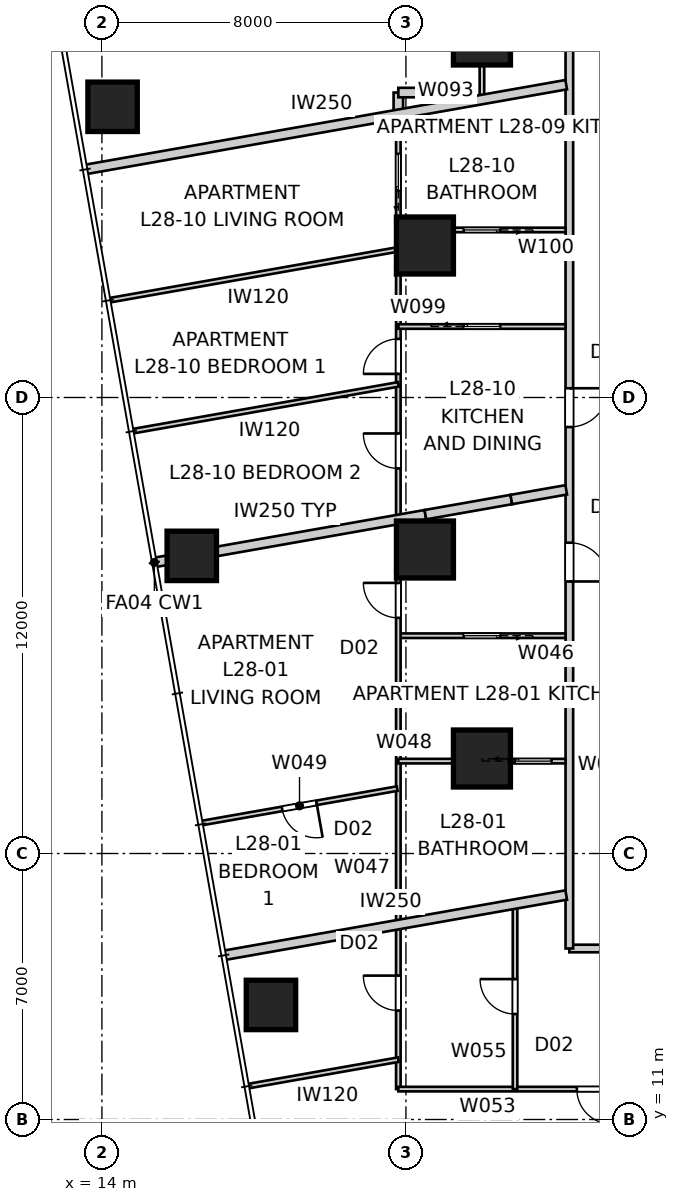
"""IFC4 building model, lengths in metres.
Left out: names, types, materials, properties, quantities, classifications, styles, units other than length and angle.
Written with IfcOpenShell. Run it as: python <this file> out.ifc"""

import sys

from ifc_helpers import new_model, si_unit, direction, frame, frame_2d, origin, origin_2d, place, context, subcontext, project, spatial, rectangle, extrude, element, fill, save


model = new_model("IFC4")
c1 = context("Model", 3, precision=1e-05, world=origin(), true_north=direction((0.0, 1.0)))
c2 = subcontext(c1, "Body", "Model", "MODEL_VIEW")
j1 = project(units=[si_unit("LENGTHUNIT", "METRE"), si_unit("PLANEANGLEUNIT", "RADIAN")], contexts=[c1])
p1 = place(None, origin())
s1 = spatial("IfcSite", under=j1, at=p1, CompositionType="ELEMENT")
p2 = place(p1, origin())
s2 = spatial("IfcBuilding", under=s1, at=p2, CompositionType="ELEMENT")
p3 = place(p2, frame((0.0, 0.0, 103.2)))
s3 = spatial("IfcBuildingStorey", under=s2, at=p3, CompositionType="ELEMENT", Elevation=103.2)
for number, where, z_axis, x_axis in (
    (1, (14.281, 37.65, 0.0), (0.0, 0.0, 1.0), (1.0, 0.0, 0.0)),
    (2, (16.365, 25.833, 0.0), (0.0, 0.0, 1.0), (1.0, 0.0, 0.0)),
    (3, (18.448, 14.015, 0.0), (0.0, 0.0, 1.0), (1.0, 0.0, 0.0)),
):
    element("IfcColumn", number, at=place(p3, frame(where, z_axis=z_axis, x_axis=x_axis)), inside=s3, PredefinedType="COLUMN", context=c2, shape_type="SweptSolid", body=[
        extrude(rectangle(XDim=1.3, YDim=1.3, at=origin_2d()), origin(), (0.0, 0.0, 1.0), 3.2),
    ])
for number, where, z_axis, x_axis in (
    (4, (24.0, 39.5, 0.0), (0.0, 0.0, 1.0), (1.0, 0.0, 0.0)),
    (5, (22.5, 34.0, 0.0), (0.0, 0.0, 1.0), (1.0, 0.0, 0.0)),
    (6, (22.5, 26.0, 0.0), (0.0, 0.0, 1.0), (1.0, 0.0, 0.0)),
    (7, (24.0, 20.5, 0.0), (0.0, 0.0, 1.0), (1.0, 0.0, 0.0)),
):
    element("IfcColumn", number, at=place(p3, frame(where, z_axis=z_axis, x_axis=x_axis)), inside=s3, PredefinedType="COLUMN", context=c2, shape_type="SweptSolid", body=[
        extrude(rectangle(XDim=1.5, YDim=1.5, at=origin_2d()), origin(), (0.0, 0.0, 1.0), 3.4),
    ])
p4 = place(p3, frame((26.3, 15.5, 0.0), z_axis=(0.0, 0.0, 1.0), x_axis=(1.0, 0.0, 0.0)))
e8 = element("IfcWall", 8, at=p4, inside=s3, PredefinedType="PARTITIONING", context=c2, shape_type="SweptSolid", body=[
    extrude(rectangle(XDim=27.4, YDim=0.2, at=frame_2d((13.7, 0.0))), origin(), (0.0, 0.0, 1.0), 3.2),
])
p5 = place(p4, frame((24.455, 0.0, 0.0)))
e9 = element("IfcOpeningElement", 9, at=p5, cuts=e8, PredefinedType="OPENING", context=c2, shape_type="SweptSolid", body=[
    extrude(rectangle(XDim=1.02, YDim=2.0, at=frame_2d((0.51, 1.0))), frame((0.0, 0.11, 0.0), z_axis=(0.0, -1.0, 0.0), x_axis=(1.0, 0.0, 0.0)), (0.0, 0.0, 1.0), 0.22),
])
p6 = place(p4, frame((1.765, 0.0, 0.0)))
e10 = element("IfcOpeningElement", 10, at=p6, cuts=e8, PredefinedType="OPENING", context=c2, shape_type="SweptSolid", body=[
    extrude(rectangle(XDim=1.02, YDim=2.0, at=frame_2d((0.51, 1.0))), frame((0.0, 0.11, 0.0), z_axis=(0.0, -1.0, 0.0), x_axis=(1.0, 0.0, 0.0)), (0.0, 0.0, 1.0), 0.22),
])
p7 = place(p3, frame((26.3, 44.5, 0.0), z_axis=(0.0, 0.0, 1.0), x_axis=(0.0, -1.0, 0.0)))
e11 = element("IfcWall", 11, at=p7, inside=s3, PredefinedType="PARTITIONING", context=c2, shape_type="SweptSolid", body=[
    extrude(rectangle(XDim=29.0, YDim=0.2, at=frame_2d((14.5, 0.0))), origin(), (0.0, 0.0, 1.0), 3.2),
])
p8 = place(p7, frame((14.257, 0.0, 0.0)))
e12 = element("IfcOpeningElement", 12, at=p8, cuts=e11, PredefinedType="OPENING", context=c2, shape_type="SweptSolid", body=[
    extrude(rectangle(XDim=1.02, YDim=2.34, at=frame_2d((0.51, 1.17))), frame((0.0, 0.11, 0.0), z_axis=(0.0, -1.0, 0.0), x_axis=(1.0, 0.0, 0.0)), (0.0, 0.0, 1.0), 0.22),
])
p9 = place(p7, frame((18.322, 0.0, 0.0)))
e13 = element("IfcOpeningElement", 13, at=p9, cuts=e11, PredefinedType="OPENING", context=c2, shape_type="SweptSolid", body=[
    extrude(rectangle(XDim=1.02, YDim=2.34, at=frame_2d((0.51, 1.17))), frame((0.0, 0.11, 0.0), z_axis=(0.0, -1.0, 0.0), x_axis=(1.0, 0.0, 0.0)), (0.0, 0.0, 1.0), 0.22),
])
p10 = place(p7, frame((4.263, 0.0, 0.0)))
e14 = element("IfcOpeningElement", 14, at=p10, cuts=e11, PredefinedType="OPENING", context=c2, shape_type="SweptSolid", body=[
    extrude(rectangle(XDim=1.02, YDim=2.34, at=frame_2d((0.51, 1.17))), frame((0.0, 0.11, 0.0), z_axis=(0.0, -1.0, 0.0), x_axis=(1.0, 0.0, 0.0)), (0.0, 0.0, 1.0), 0.22),
])
p11 = place(p3, frame((13.556, 35.999, 0.0), z_axis=(0.0, 0.0, 1.0), x_axis=(0.984809355703, 0.173639088111, 0.0)))
e15 = element("IfcWall", 15, at=p11, inside=s3, PredefinedType="PARTITIONING", context=c2, shape_type="SweptSolid", body=[
    extrude(rectangle(XDim=12.857, YDim=0.25, at=frame_2d((6.428, 0.0))), origin(), (0.0, 0.0, 1.0), 3.2),
])
p12 = place(p3, frame((17.203, 15.318, 0.0), z_axis=(0.0, 0.0, 1.0), x_axis=(0.984810933893, 0.173630137029, 0.0)))
e16 = element("IfcWall", 16, at=p12, inside=s3, PredefinedType="PARTITIONING", context=c2, shape_type="SweptSolid", body=[
    extrude(rectangle(XDim=9.154, YDim=0.25, at=frame_2d((4.577, 0.0))), origin(), (0.0, 0.0, 1.0), 3.2),
])
p13 = place(p3, frame((15.38, 25.659, 0.0), z_axis=(0.0, 0.0, 1.0), x_axis=(0.984806967559, 0.173652632134, 0.0)))
e17 = element("IfcWall", 17, at=p13, inside=s3, PredefinedType="PARTITIONING", context=c2, shape_type="SweptSolid", body=[
    extrude(rectangle(XDim=7.242, YDim=0.25, at=frame_2d((3.621, 0.0))), origin(), (0.0, 0.0, 1.0), 3.2),
])
p14 = place(p3, frame((22.512, 26.916, 0.0), z_axis=(0.0, 0.0, 1.0), x_axis=(0.98479532969, 0.173718619099, 0.0)))
e18 = element("IfcWall", 18, at=p14, inside=s3, PredefinedType="PARTITIONING", context=c2, shape_type="SweptSolid", body=[
    extrude(rectangle(XDim=2.296, YDim=0.25, at=frame_2d((1.148, 0.0))), origin(), (0.0, 0.0, 1.0), 2.672),
])
p15 = place(p3, frame((24.773, 27.315, 0.0), z_axis=(0.0, 0.0, 1.0), x_axis=(0.984817051632, 0.173595434317, 0.0)))
e19 = element("IfcWall", 19, at=p15, inside=s3, PredefinedType="PARTITIONING", context=c2, shape_type="SweptSolid", body=[
    extrude(rectangle(XDim=1.467, YDim=0.25, at=frame_2d((0.733, 0.0))), origin(), (0.0, 0.0, 1.0), 3.2),
])
p16 = place(p3, frame((26.2, 23.731, 0.0), z_axis=(0.0, 0.0, 1.0), x_axis=(-1.0, 0.0, 0.0)))
e20 = element("IfcWall", 20, at=p16, inside=s3, PredefinedType="PARTITIONING", context=c2, shape_type="SweptSolid", body=[
    extrude(rectangle(XDim=4.4, YDim=0.12, at=frame_2d((2.2, 0.0))), origin(), (0.0, 0.0, 1.0), 3.2),
])
p17 = place(p16, frame((1.72, 0.0, 0.0)))
e21 = element("IfcOpeningElement", 21, at=p17, cuts=e20, PredefinedType="OPENING", context=c2, shape_type="SweptSolid", body=[
    extrude(rectangle(XDim=0.96, YDim=2.1, at=frame_2d((0.48, 1.05))), frame((0.0, 0.07, 0.0), z_axis=(0.0, -1.0, 0.0), x_axis=(1.0, 0.0, 0.0)), (0.0, 0.0, 1.0), 0.14),
])
p18 = place(p3, frame((21.8, 11.8, 0.0), z_axis=(0.0, 0.0, 1.0), x_axis=(0.0, 1.0, 0.0)))
e22 = element("IfcWall", 22, at=p18, inside=s3, PredefinedType="PARTITIONING", context=c2, shape_type="SweptSolid", body=[
    extrude(rectangle(XDim=25.653, YDim=0.12, at=frame_2d((12.826, 0.0))), origin(), (0.0, 0.0, 1.0), 3.2),
])
p19 = place(p18, frame((16.333, 0.0, 0.0)))
e23 = element("IfcOpeningElement", 23, at=p19, cuts=e22, PredefinedType="OPENING", context=c2, shape_type="SweptSolid", body=[
    extrude(rectangle(XDim=0.92, YDim=2.34, at=frame_2d((0.46, 1.17))), frame((0.0, 0.07, 0.0), z_axis=(0.0, -1.0, 0.0), x_axis=(1.0, 0.0, 0.0)), (0.0, 0.0, 1.0), 0.14),
])
p20 = place(p18, frame((18.821, 0.0, 0.0)))
e24 = element("IfcOpeningElement", 24, at=p20, cuts=e22, PredefinedType="OPENING", context=c2, shape_type="SweptSolid", body=[
    extrude(rectangle(XDim=0.92, YDim=2.34, at=frame_2d((0.46, 1.17))), frame((0.0, 0.07, 0.0), z_axis=(0.0, -1.0, 0.0), x_axis=(1.0, 0.0, 0.0)), (0.0, 0.0, 1.0), 0.14),
])
p21 = place(p18, frame((12.401, 0.0, 0.0)))
e25 = element("IfcOpeningElement", 25, at=p21, cuts=e22, PredefinedType="OPENING", context=c2, shape_type="SweptSolid", body=[
    extrude(rectangle(XDim=0.92, YDim=2.34, at=frame_2d((0.46, 1.17))), frame((0.0, 0.07, 0.0), z_axis=(0.0, -1.0, 0.0), x_axis=(1.0, 0.0, 0.0)), (0.0, 0.0, 1.0), 0.14),
])
p22 = place(p18, frame((2.066, 0.0, 0.0)))
e26 = element("IfcOpeningElement", 26, at=p22, cuts=e22, PredefinedType="OPENING", context=c2, shape_type="SweptSolid", body=[
    extrude(rectangle(XDim=0.92, YDim=2.34, at=frame_2d((0.46, 1.17))), frame((0.0, 0.07, 0.0), z_axis=(0.0, -1.0, 0.0), x_axis=(1.0, 0.0, 0.0)), (0.0, 0.0, 1.0), 0.14),
])
p23 = place(p18, frame((23.651, 0.0, 0.0)))
e27 = element("IfcOpeningElement", 27, at=p23, cuts=e22, PredefinedType="OPENING", context=c2, shape_type="SweptSolid", body=[
    extrude(rectangle(XDim=0.96, YDim=2.1, at=frame_2d((0.48, 1.05))), frame((0.0, 0.07, 0.0), z_axis=(0.0, -1.0, 0.0), x_axis=(1.0, 0.0, 0.0)), (0.0, 0.0, 1.0), 0.14),
])
p24 = place(p3, frame((21.8, 20.431, 0.0), z_axis=(0.0, 0.0, 1.0), x_axis=(1.0, 0.0, 0.0)))
e28 = element("IfcWall", 28, at=p24, inside=s3, PredefinedType="PARTITIONING", context=c2, shape_type="SweptSolid", body=[
    extrude(rectangle(XDim=4.4, YDim=0.12, at=frame_2d((2.2, 0.0))), origin(), (0.0, 0.0, 1.0), 3.2),
])
p25 = place(p24, frame((3.07, 0.0, 0.0)))
e29 = element("IfcOpeningElement", 29, at=p25, cuts=e28, PredefinedType="OPENING", context=c2, shape_type="SweptSolid", body=[
    extrude(rectangle(XDim=0.96, YDim=2.1, at=frame_2d((0.48, 1.05))), frame((0.0, 0.07, 0.0), z_axis=(0.0, -1.0, 0.0), x_axis=(1.0, 0.0, 0.0)), (0.0, 0.0, 1.0), 0.14),
])
p26 = place(p3, frame((21.77, 19.708, 0.0), z_axis=(0.0, 0.0, 1.0), x_axis=(-0.984812268581, -0.173622566657, 0.0)))
e30 = element("IfcWall", 30, at=p26, inside=s3, PredefinedType="PARTITIONING", context=c2, shape_type="SweptSolid", body=[
    extrude(rectangle(XDim=5.22, YDim=0.12, at=frame_2d((2.61, 0.0))), origin(), (0.0, 0.0, 1.0), 3.2),
])
p27 = place(p26, frame((2.155, 0.0, 0.0)))
e31 = element("IfcOpeningElement", 31, at=p27, cuts=e30, PredefinedType="OPENING", context=c2, shape_type="SweptSolid", body=[
    extrude(rectangle(XDim=0.92, YDim=2.34, at=frame_2d((0.46, 1.17))), frame((0.0, 0.07, 0.0), z_axis=(0.0, -1.0, 0.0), x_axis=(1.0, 0.0, 0.0)), (0.0, 0.0, 1.0), 0.14),
])
p28 = place(p3, frame((21.8, 37.478, 0.0), z_axis=(0.0, 0.0, 1.0), x_axis=(0.0, 1.0, 0.0)))
e32 = element("IfcWall", 32, at=p28, inside=s3, PredefinedType="PARTITIONING", context=c2, shape_type="SweptSolid", body=[
    extrude(rectangle(XDim=0.547, YDim=0.25, at=frame_2d((0.273, 0.0))), origin(), (0.0, 0.0, 1.0), 3.2),
])
p29 = place(p3, frame((21.8, 38.025, 0.0), z_axis=(0.0, 0.0, 1.0), x_axis=(1.0, 0.0, 0.0)))
e33 = element("IfcWall", 33, at=p29, inside=s3, PredefinedType="PARTITIONING", context=c2, shape_type="SweptSolid", body=[
    extrude(rectangle(XDim=1.861, YDim=0.25, at=frame_2d((0.93, 0.0))), origin(), (0.0, 0.0, 1.0), 3.2),
])
p30 = place(p3, frame((31.975, 11.8, 0.0), z_axis=(0.0, 0.0, 1.0), x_axis=(-1.0, 0.0, 0.0)))
e34 = element("IfcWall", 34, at=p30, inside=s3, PredefinedType="PARTITIONING", context=c2, shape_type="SweptSolid", body=[
    extrude(rectangle(XDim=10.175, YDim=0.12, at=frame_2d((5.088, 0.0))), origin(), (0.0, 0.0, 1.0), 3.2),
])
p31 = place(p30, frame((4.558, 0.0, 0.0)))
e35 = element("IfcOpeningElement", 35, at=p31, cuts=e34, PredefinedType="OPENING", context=c2, shape_type="SweptSolid", body=[
    extrude(rectangle(XDim=0.92, YDim=2.0, at=frame_2d((0.46, 1.0))), frame((0.0, 0.07, 0.0), z_axis=(0.0, -1.0, 0.0), x_axis=(1.0, 0.0, 0.0)), (0.0, 0.0, 1.0), 0.14),
])
p32 = place(p3, frame((24.871, 11.8, 0.0), z_axis=(0.0, 0.0, 1.0), x_axis=(0.0, 1.0, 0.0)))
e36 = element("IfcWall", 36, at=p32, inside=s3, PredefinedType="PARTITIONING", context=c2, shape_type="SweptSolid", body=[
    extrude(rectangle(XDim=4.87, YDim=0.12, at=frame_2d((2.435, 0.0))), origin(), (0.0, 0.0, 1.0), 3.2),
])
p33 = place(p32, frame((1.975, 0.0, 0.0)))
e37 = element("IfcOpeningElement", 37, at=p33, cuts=e36, PredefinedType="OPENING", context=c2, shape_type="SweptSolid", body=[
    extrude(rectangle(XDim=0.92, YDim=2.34, at=frame_2d((0.46, 1.17))), frame((0.0, 0.07, 0.0), z_axis=(0.0, -1.0, 0.0), x_axis=(1.0, 0.0, 0.0)), (0.0, 0.0, 1.0), 0.14),
])
p34 = place(p3, frame((17.85, 11.878, 0.0), z_axis=(0.0, 0.0, 1.0), x_axis=(0.984803775068, 0.173670736201, 0.0)))
e38 = element("IfcWall", 38, at=p34, inside=s3, PredefinedType="PARTITIONING", context=c2, shape_type="SweptSolid", body=[
    extrude(rectangle(XDim=4.011, YDim=0.12, at=frame_2d((2.005, 0.0))), origin(), (0.0, 0.0, 1.0), 2.4),
])
p35 = place(p3, frame((24.0, 37.948, 0.0), z_axis=(0.0, 0.0, 1.0), x_axis=(0.0, 1.0, 0.0)))
e39 = element("IfcWall", 39, at=p35, inside=s3, PredefinedType="PARTITIONING", context=c2, shape_type="SweptSolid", body=[
    extrude(rectangle(XDim=3.847, YDim=0.12, at=frame_2d((1.923, 0.0))), origin(), (0.0, 0.0, 1.0), 2.2),
])
p36 = place(p35, frame((2.402, 0.0, 0.0)))
e40 = element("IfcOpeningElement", 40, at=p36, cuts=e39, PredefinedType="OPENING", context=c2, shape_type="SweptSolid", body=[
    extrude(rectangle(XDim=0.92, YDim=2.0, at=frame_2d((0.46, 1.0))), frame((0.0, 0.07, 0.0), z_axis=(0.0, -1.0, 0.0), x_axis=(1.0, 0.0, 0.0)), (0.0, 0.0, 1.0), 0.14),
])
p37 = place(p3, frame((21.8, 31.868, 0.0), z_axis=(0.0, 0.0, 1.0), x_axis=(1.0, 0.0, 0.0)))
e41 = element("IfcWall", 41, at=p37, inside=s3, PredefinedType="PARTITIONING", context=c2, shape_type="SweptSolid", body=[
    extrude(rectangle(XDim=4.4, YDim=0.12, at=frame_2d((2.2, 0.0))), origin(), (0.0, 0.0, 1.0), 3.2),
])
p38 = place(p37, frame((1.72, 0.0, 0.0)))
e42 = element("IfcOpeningElement", 42, at=p38, cuts=e41, PredefinedType="OPENING", context=c2, shape_type="SweptSolid", body=[
    extrude(rectangle(XDim=0.96, YDim=2.1, at=frame_2d((0.48, 1.05))), frame((0.0, 0.07, 0.0), z_axis=(0.0, -1.0, 0.0), x_axis=(1.0, 0.0, 0.0)), (0.0, 0.0, 1.0), 0.14),
])
p39 = place(p3, frame((26.2, 34.409, 0.0), z_axis=(0.0, 0.0, 1.0), x_axis=(-1.0, 0.0, 0.0)))
e43 = element("IfcWall", 43, at=p39, inside=s3, PredefinedType="PARTITIONING", context=c2, shape_type="SweptSolid", body=[
    extrude(rectangle(XDim=4.4, YDim=0.12, at=frame_2d((2.2, 0.0))), origin(), (0.0, 0.0, 1.0), 3.2),
])
p40 = place(p39, frame((1.72, 0.0, 0.0)))
e44 = element("IfcOpeningElement", 44, at=p40, cuts=e43, PredefinedType="OPENING", context=c2, shape_type="SweptSolid", body=[
    extrude(rectangle(XDim=0.96, YDim=2.1, at=frame_2d((0.48, 1.05))), frame((0.0, 0.07, 0.0), z_axis=(0.0, -1.0, 0.0), x_axis=(1.0, 0.0, 0.0)), (0.0, 0.0, 1.0), 0.14),
])
p41 = place(p3, frame((21.8, 33.899, 0.0), z_axis=(0.0, 0.0, 1.0), x_axis=(-0.984804581119, -0.173666165406, 0.0)))
e45 = element("IfcWall", 45, at=p41, inside=s3, PredefinedType="PARTITIONING", context=c2, shape_type="SweptSolid", body=[
    extrude(rectangle(XDim=7.714, YDim=0.12, at=frame_2d((3.857, 0.0))), origin(), (0.0, 0.0, 1.0), 3.2),
])
p42 = place(p3, frame((21.8, 30.345, 0.0), z_axis=(0.0, 0.0, 1.0), x_axis=(-0.984809869921, -0.17363617165, 0.0)))
e46 = element("IfcWall", 46, at=p42, inside=s3, PredefinedType="PARTITIONING", context=c2, shape_type="SweptSolid", body=[
    extrude(rectangle(XDim=7.096, YDim=0.12, at=frame_2d((3.548, 0.0))), origin(), (0.0, 0.0, 1.0), 3.2),
])
p43 = place(p8, origin())
e47 = element("IfcDoor", 47, at=p43, inside=s3, OperationType="SINGLE_SWING_LEFT", PredefinedType="DOOR", context=c2, shape_type="SweptSolid", body=[
    extrude(rectangle(XDim=1.02, YDim=2.34, at=frame_2d((0.51, 1.17))), frame((0.0, 0.025, 0.0), z_axis=(0.0, -1.0, 0.0), x_axis=(1.0, 0.0, 0.0)), (0.0, 0.0, 1.0), 0.05),
])
fill(e12, e47)
p44 = place(p9, origin())
e48 = element("IfcDoor", 48, at=p44, inside=s3, OperationType="SINGLE_SWING_RIGHT", PredefinedType="DOOR", context=c2, shape_type="SweptSolid", body=[
    extrude(rectangle(XDim=1.02, YDim=2.34, at=frame_2d((0.51, 1.17))), frame((0.0, 0.025, 0.0), z_axis=(0.0, -1.0, 0.0), x_axis=(1.0, 0.0, 0.0)), (0.0, 0.0, 1.0), 0.05),
])
fill(e13, e48)
p45 = place(p38, origin())
e49 = element("IfcDoor", 49, at=p45, inside=s3, OperationType="SLIDING_TO_LEFT", PredefinedType="DOOR", context=c2, shape_type="SweptSolid", body=[
    extrude(rectangle(XDim=0.96, YDim=2.1, at=frame_2d((0.48, 1.05))), frame((0.0, 0.025, 0.0), z_axis=(0.0, -1.0, 0.0), x_axis=(1.0, 0.0, 0.0)), (0.0, 0.0, 1.0), 0.05),
])
fill(e42, e49)
p46 = place(p19, origin())
e50 = element("IfcDoor", 50, at=p46, inside=s3, OperationType="SINGLE_SWING_RIGHT", PredefinedType="DOOR", context=c2, shape_type="SweptSolid", body=[
    extrude(rectangle(XDim=0.92, YDim=2.34, at=frame_2d((0.46, 1.17))), frame((0.0, 0.025, 0.0), z_axis=(0.0, -1.0, 0.0), x_axis=(1.0, 0.0, 0.0)), (0.0, 0.0, 1.0), 0.05),
])
fill(e23, e50)
p47 = place(p20, origin())
e51 = element("IfcDoor", 51, at=p47, inside=s3, OperationType="SINGLE_SWING_LEFT", PredefinedType="DOOR", context=c2, shape_type="SweptSolid", body=[
    extrude(rectangle(XDim=0.92, YDim=2.34, at=frame_2d((0.46, 1.17))), frame((0.0, 0.025, 0.0), z_axis=(0.0, -1.0, 0.0), x_axis=(1.0, 0.0, 0.0)), (0.0, 0.0, 1.0), 0.05),
])
fill(e24, e51)
p48 = place(p17, origin())
e52 = element("IfcDoor", 52, at=p48, inside=s3, OperationType="SLIDING_TO_LEFT", PredefinedType="DOOR", context=c2, shape_type="SweptSolid", body=[
    extrude(rectangle(XDim=0.96, YDim=2.1, at=frame_2d((0.48, 1.05))), frame((0.0, 0.025, 0.0), z_axis=(0.0, -1.0, 0.0), x_axis=(1.0, 0.0, 0.0)), (0.0, 0.0, 1.0), 0.05),
])
fill(e21, e52)
p49 = place(p21, origin())
e53 = element("IfcDoor", 53, at=p49, inside=s3, OperationType="SINGLE_SWING_RIGHT", PredefinedType="DOOR", context=c2, shape_type="SweptSolid", body=[
    extrude(rectangle(XDim=0.92, YDim=2.34, at=frame_2d((0.46, 1.17))), frame((0.0, 0.025, 0.0), z_axis=(0.0, -1.0, 0.0), x_axis=(1.0, 0.0, 0.0)), (0.0, 0.0, 1.0), 0.05),
])
fill(e25, e53)
p50 = place(p33, origin())
e54 = element("IfcDoor", 54, at=p50, inside=s3, OperationType="SINGLE_SWING_RIGHT", PredefinedType="DOOR", context=c2, shape_type="SweptSolid", body=[
    extrude(rectangle(XDim=0.92, YDim=2.34, at=frame_2d((0.46, 1.17))), frame((0.0, 0.025, 0.0), z_axis=(0.0, -1.0, 0.0), x_axis=(1.0, 0.0, 0.0)), (0.0, 0.0, 1.0), 0.05),
])
fill(e37, e54)
p51 = place(p31, origin())
e55 = element("IfcDoor", 55, at=p51, inside=s3, OperationType="SINGLE_SWING_LEFT", PredefinedType="DOOR", context=c2, shape_type="SweptSolid", body=[
    extrude(rectangle(XDim=0.92, YDim=2.0, at=frame_2d((0.46, 1.0))), frame((0.0, 0.025, 0.0), z_axis=(0.0, -1.0, 0.0), x_axis=(1.0, 0.0, 0.0)), (0.0, 0.0, 1.0), 0.05),
])
fill(e35, e55)
p52 = place(p40, origin())
e56 = element("IfcDoor", 56, at=p52, inside=s3, OperationType="SLIDING_TO_LEFT", PredefinedType="DOOR", context=c2, shape_type="SweptSolid", body=[
    extrude(rectangle(XDim=0.96, YDim=2.1, at=frame_2d((0.48, 1.05))), frame((0.0, 0.025, 0.0), z_axis=(0.0, -1.0, 0.0), x_axis=(1.0, 0.0, 0.0)), (0.0, 0.0, 1.0), 0.05),
])
fill(e44, e56)
p53 = place(p25, origin())
e57 = element("IfcDoor", 57, at=p53, inside=s3, OperationType="SLIDING_TO_LEFT", PredefinedType="DOOR", context=c2, shape_type="SweptSolid", body=[
    extrude(rectangle(XDim=0.96, YDim=2.1, at=frame_2d((0.48, 1.05))), frame((0.0, 0.025, 0.0), z_axis=(0.0, -1.0, 0.0), x_axis=(1.0, 0.0, 0.0)), (0.0, 0.0, 1.0), 0.05),
])
fill(e29, e57)
p54 = place(p27, origin())
e58 = element("IfcDoor", 58, at=p54, inside=s3, OperationType="SINGLE_SWING_LEFT", PredefinedType="DOOR", context=c2, shape_type="SweptSolid", body=[
    extrude(rectangle(XDim=0.92, YDim=2.34, at=frame_2d((0.46, 1.17))), frame((0.0, 0.025, 0.0), z_axis=(0.0, -1.0, 0.0), x_axis=(1.0, 0.0, 0.0)), (0.0, 0.0, 1.0), 0.05),
])
fill(e31, e58)
p55 = place(p22, origin())
e59 = element("IfcDoor", 59, at=p55, inside=s3, OperationType="SINGLE_SWING_RIGHT", PredefinedType="DOOR", context=c2, shape_type="SweptSolid", body=[
    extrude(rectangle(XDim=0.92, YDim=2.34, at=frame_2d((0.46, 1.17))), frame((0.0, 0.025, 0.0), z_axis=(0.0, -1.0, 0.0), x_axis=(1.0, 0.0, 0.0)), (0.0, 0.0, 1.0), 0.05),
])
fill(e26, e59)
p56 = place(p23, origin())
e60 = element("IfcDoor", 60, at=p56, inside=s3, OperationType="SLIDING_TO_LEFT", PredefinedType="DOOR", context=c2, shape_type="SweptSolid", body=[
    extrude(rectangle(XDim=0.96, YDim=2.1, at=frame_2d((0.48, 1.05))), frame((0.0, 0.025, 0.0), z_axis=(0.0, -1.0, 0.0), x_axis=(1.0, 0.0, 0.0)), (0.0, 0.0, 1.0), 0.05),
])
fill(e27, e60)
save(model, sys.argv[1])
